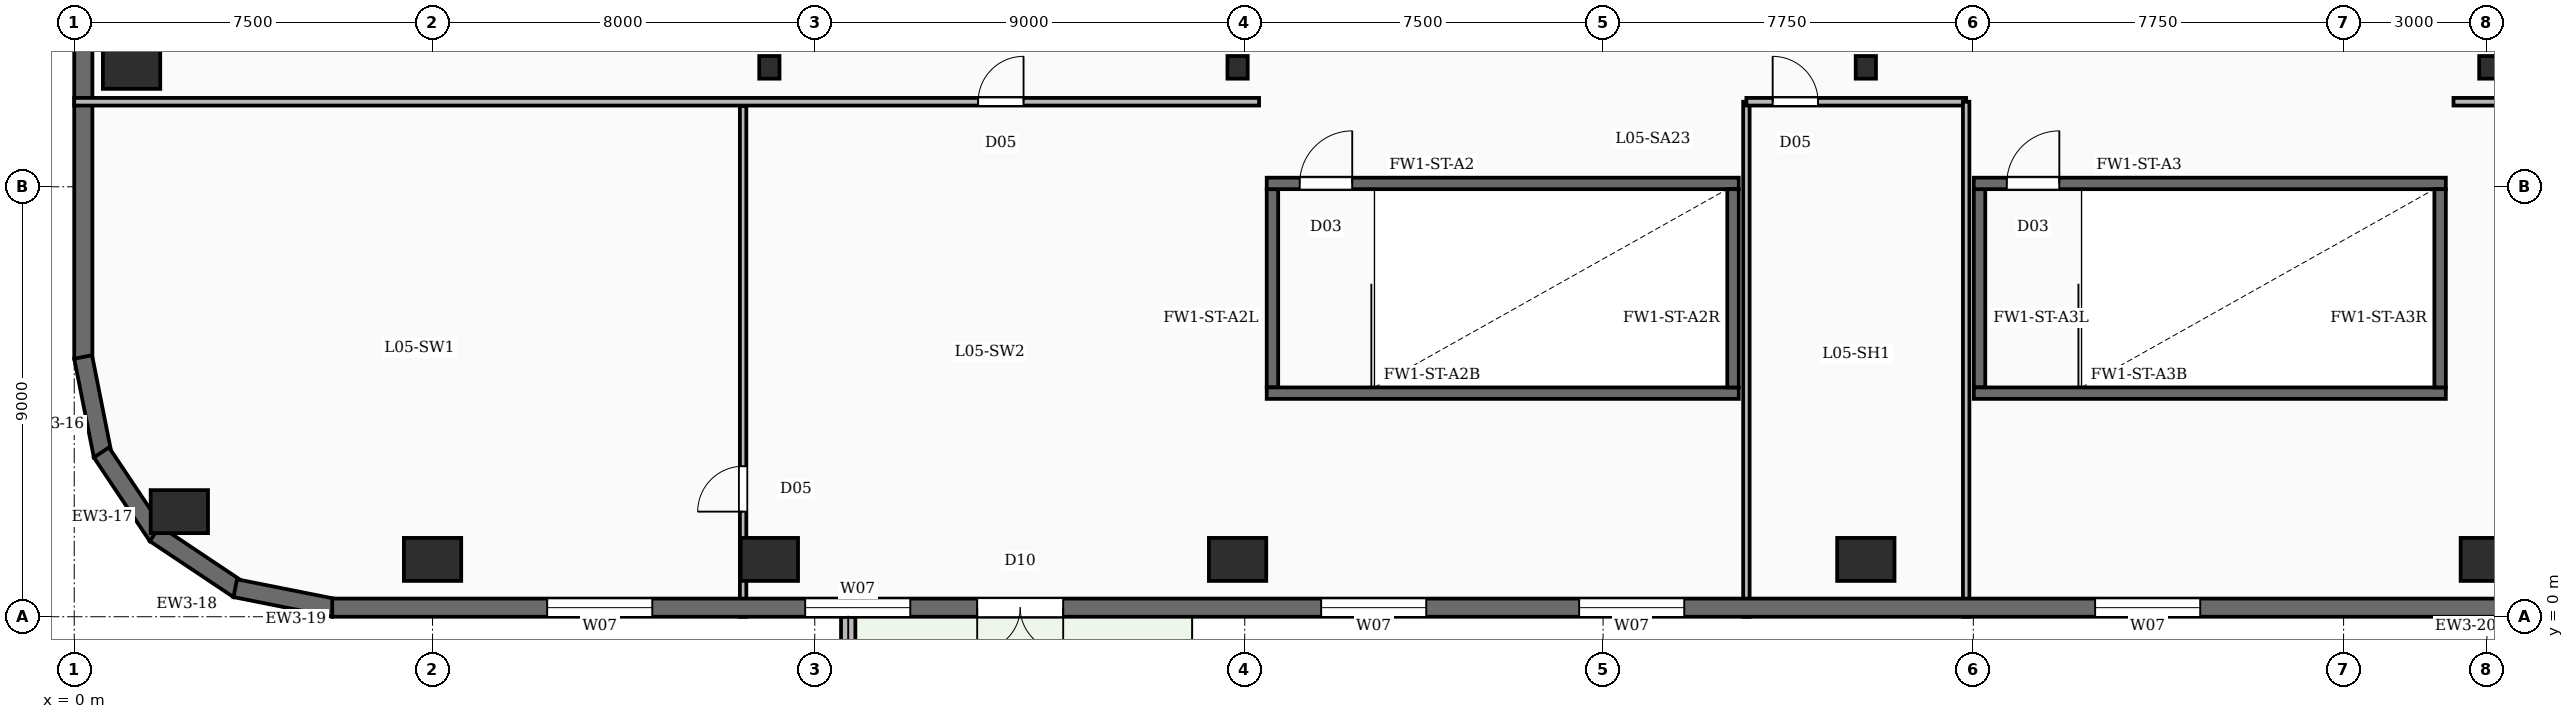
"""IFC4 building model, lengths in metres.
Left out: names, types, materials, properties, quantities, classifications, styles, units other than length and angle.
Written with IfcOpenShell. Run it as: python <this file> out.ifc"""

import sys

from ifc_helpers import new_model, si_unit, direction, frame, frame_2d, origin, origin_2d, place, context, subcontext, project, spatial, rectangle, i_section, extrude, element, fill, save


model = new_model("IFC4")
c1 = context("Model", 3, precision=1e-05, world=origin(), true_north=direction((0.0, 1.0)))
c2 = subcontext(c1, "Body", "Model", "MODEL_VIEW")
j1 = project(units=[si_unit("LENGTHUNIT", "METRE"), si_unit("PLANEANGLEUNIT", "RADIAN")], contexts=[c1])
p1 = place(None, origin())
s1 = spatial("IfcSite", under=j1, at=p1, CompositionType="ELEMENT")
p2 = place(p1, origin())
s2 = spatial("IfcBuilding", under=s1, at=p2, CompositionType="ELEMENT")
p3 = place(p2, frame((0.0, 0.0, 28.0)))
s3 = spatial("IfcBuildingStorey", under=s2, at=p3, CompositionType="ELEMENT", Elevation=28.0)
for number, where, z_axis, x_axis in (
    (1, (2.2, 2.2, -0.35), (0.0, 0.0, 1.0), (1.0, 0.0, 0.0)),
    (2, (7.5, 1.2, -0.35), (0.0, 0.0, 1.0), (1.0, 0.0, 0.0)),
    (3, (14.55, 1.2, -0.35), (0.0, 0.0, 1.0), (1.0, 0.0, 0.0)),
    (4, (24.35, 1.2, -0.35), (0.0, 0.0, 1.0), (1.0, 0.0, 0.0)),
    (5, (37.5, 1.2, -0.35), (0.0, 0.0, 1.0), (1.0, 0.0, 0.0)),
    (6, (50.55, 1.2, -0.35), (0.0, 0.0, 1.0), (1.0, 0.0, 0.0)),
    (7, (1.2, 11.5, -0.35), (0.0, 0.0, 1.0), (1.0, 0.0, 0.0)),
):
    element("IfcColumn", number, at=place(p3, frame(where, z_axis=z_axis, x_axis=x_axis)), inside=s3, PredefinedType="COLUMN", context=c2, shape_type="SweptSolid", body=[
        extrude(rectangle(XDim=1.2, YDim=0.9, at=origin_2d()), origin(), (0.0, 0.0, 1.0), 5.9),
    ])
for number, where, z_axis, x_axis in (
    (8, (14.55, 11.5, -0.35), (0.0, 0.0, 1.0), (1.0, 0.0, 0.0)),
    (9, (24.35, 11.5, -0.35), (0.0, 0.0, 1.0), (1.0, 0.0, 0.0)),
    (10, (37.5, 11.5, -0.35), (0.0, 0.0, 1.0), (1.0, 0.0, 0.0)),
    (11, (50.55, 11.5, -0.35), (0.0, 0.0, 1.0), (1.0, 0.0, 0.0)),
):
    element("IfcColumn", number, at=place(p3, frame(where, z_axis=z_axis, x_axis=x_axis)), inside=s3, PredefinedType="COLUMN", context=c2, shape_type="SweptSolid", body=[
        extrude(i_section(OverallWidth=0.424, OverallDepth=0.474, WebThickness=0.048, FlangeThickness=0.077, FilletRadius=0.02, at=origin_2d()), origin(), (0.0, 0.0, 1.0), 5.9),
    ])
p4 = place(p3, frame((0.19, 5.4, 0.0), z_axis=(0.0, 0.0, 1.0), x_axis=(0.0, 1.0, 0.0)))
e12 = element("IfcWall", 12, at=p4, inside=s3, PredefinedType="SOLIDWALL", context=c2, shape_type="SweptSolid", body=[
    extrude(rectangle(XDim=43.7, YDim=0.38, at=frame_2d((21.85, 0.0))), origin(), (0.0, 0.0, 1.0), 5.55),
])
p5 = place(p4, frame((8.0, 0.0, 0.95)))
e13 = element("IfcOpeningElement", 13, at=p5, cuts=e12, PredefinedType="OPENING", context=c2, shape_type="SweptSolid", body=[
    extrude(rectangle(XDim=2.2, YDim=2.5, at=frame_2d((1.1, 1.25))), frame((0.0, 0.2, 0.0), z_axis=(0.0, -1.0, 0.0), x_axis=(1.0, 0.0, 0.0)), (0.0, 0.0, 1.0), 0.4),
])
p6 = place(p4, frame((18.8, 0.0, 0.95)))
e14 = element("IfcOpeningElement", 14, at=p6, cuts=e12, PredefinedType="OPENING", context=c2, shape_type="SweptSolid", body=[
    extrude(rectangle(XDim=2.2, YDim=2.5, at=frame_2d((1.1, 1.25))), frame((0.0, 0.2, 0.0), z_axis=(0.0, -1.0, 0.0), x_axis=(1.0, 0.0, 0.0)), (0.0, 0.0, 1.0), 0.4),
])
p7 = place(p4, frame((29.6, 0.0, 0.95)))
e15 = element("IfcOpeningElement", 15, at=p7, cuts=e12, PredefinedType="OPENING", context=c2, shape_type="SweptSolid", body=[
    extrude(rectangle(XDim=2.2, YDim=2.5, at=frame_2d((1.1, 1.25))), frame((0.0, 0.2, 0.0), z_axis=(0.0, -1.0, 0.0), x_axis=(1.0, 0.0, 0.0)), (0.0, 0.0, 1.0), 0.4),
])
for number, where, z_axis, x_axis in (
    (16, (0.597, 3.371, 0.0), (0.0, 0.0, 1.0), (-0.195, 0.981, 0.0)),
    (17, (1.74, 1.687, 0.0), (0.0, 0.0, 1.0), (-0.556, 0.832, 0.0)),
    (18, (3.439, 0.569, 0.0), (0.0, 0.0, 1.0), (-0.832, 0.556, 0.0)),
    (19, (5.437, 0.186, 0.0), (0.0, 0.0, 1.0), (-0.981, 0.195, 0.0)),
):
    element("IfcWall", number, at=place(p3, frame(where, z_axis=z_axis, x_axis=x_axis)), inside=s3, PredefinedType="SOLIDWALL", context=c2, shape_type="SweptSolid", body=[
        extrude(rectangle(XDim=2.107, YDim=0.38, at=frame_2d((1.053, 0.0))), origin(), (0.0, 0.0, 1.0), 5.55),
    ])
p8 = place(p3, frame((74.1, 0.19, 0.0), z_axis=(0.0, 0.0, 1.0), x_axis=(-1.0, 0.0, 0.0)))
e20 = element("IfcWall", 20, at=p8, inside=s3, PredefinedType="SOLIDWALL", context=c2, shape_type="SweptSolid", body=[
    extrude(rectangle(XDim=68.7, YDim=0.38, at=frame_2d((34.35, 0.0))), origin(), (0.0, 0.0, 1.0), 5.55),
])
p9 = place(p8, frame((53.4, 0.0, 0.0)))
e21 = element("IfcOpeningElement", 21, at=p9, cuts=e20, PredefinedType="OPENING", context=c2, shape_type="SweptSolid", body=[
    extrude(rectangle(XDim=1.8, YDim=2.25, at=frame_2d((0.9, 1.125))), frame((0.0, 0.2, 0.0), z_axis=(0.0, -1.0, 0.0), x_axis=(1.0, 0.0, 0.0)), (0.0, 0.0, 1.0), 0.4),
])
p10 = place(p8, frame((18.8, 0.0, 0.95)))
e22 = element("IfcOpeningElement", 22, at=p10, cuts=e20, PredefinedType="OPENING", context=c2, shape_type="SweptSolid", body=[
    extrude(rectangle(XDim=2.2, YDim=2.5, at=frame_2d((1.1, 1.25))), frame((0.0, 0.2, 0.0), z_axis=(0.0, -1.0, 0.0), x_axis=(1.0, 0.0, 0.0)), (0.0, 0.0, 1.0), 0.4),
])
p11 = place(p8, frame((29.6, 0.0, 0.95)))
e23 = element("IfcOpeningElement", 23, at=p11, cuts=e20, PredefinedType="OPENING", context=c2, shape_type="SweptSolid", body=[
    extrude(rectangle(XDim=2.2, YDim=2.5, at=frame_2d((1.1, 1.25))), frame((0.0, 0.2, 0.0), z_axis=(0.0, -1.0, 0.0), x_axis=(1.0, 0.0, 0.0)), (0.0, 0.0, 1.0), 0.4),
])
p12 = place(p8, frame((40.4, 0.0, 0.95)))
e24 = element("IfcOpeningElement", 24, at=p12, cuts=e20, PredefinedType="OPENING", context=c2, shape_type="SweptSolid", body=[
    extrude(rectangle(XDim=2.2, YDim=2.5, at=frame_2d((1.1, 1.25))), frame((0.0, 0.2, 0.0), z_axis=(0.0, -1.0, 0.0), x_axis=(1.0, 0.0, 0.0)), (0.0, 0.0, 1.0), 0.4),
])
p13 = place(p8, frame((45.8, 0.0, 0.95)))
e25 = element("IfcOpeningElement", 25, at=p13, cuts=e20, PredefinedType="OPENING", context=c2, shape_type="SweptSolid", body=[
    extrude(rectangle(XDim=2.2, YDim=2.5, at=frame_2d((1.1, 1.25))), frame((0.0, 0.2, 0.0), z_axis=(0.0, -1.0, 0.0), x_axis=(1.0, 0.0, 0.0)), (0.0, 0.0, 1.0), 0.4),
])
p14 = place(p8, frame((56.6, 0.0, 0.95)))
e26 = element("IfcOpeningElement", 26, at=p14, cuts=e20, PredefinedType="OPENING", context=c2, shape_type="SweptSolid", body=[
    extrude(rectangle(XDim=2.2, YDim=2.5, at=frame_2d((1.1, 1.25))), frame((0.0, 0.2, 0.0), z_axis=(0.0, -1.0, 0.0), x_axis=(1.0, 0.0, 0.0)), (0.0, 0.0, 1.0), 0.4),
])
p15 = place(p8, frame((62.0, 0.0, 0.95)))
e27 = element("IfcOpeningElement", 27, at=p15, cuts=e20, PredefinedType="OPENING", context=c2, shape_type="SweptSolid", body=[
    extrude(rectangle(XDim=2.2, YDim=2.5, at=frame_2d((1.1, 1.25))), frame((0.0, 0.2, 0.0), z_axis=(0.0, -1.0, 0.0), x_axis=(1.0, 0.0, 0.0)), (0.0, 0.0, 1.0), 0.4),
])
p16 = place(p3, frame((16.2, 0.0, 0.0), z_axis=(0.0, 0.0, 1.0), x_axis=(0.0, -1.0, 0.0)))
e28 = element("IfcWall", 28, at=p16, inside=s3, PredefinedType="PARAPET", context=c2, shape_type="SweptSolid", body=[
    extrude(rectangle(XDim=2.4, YDim=0.3, at=frame_2d((1.2, 0.0))), origin(), (0.0, 0.0, 1.0), 1.12),
])
p17 = place(p3, frame((24.96, 9.07, 0.0), z_axis=(0.0, 0.0, 1.0), x_axis=(1.0, 0.0, 0.0)))
e29 = element("IfcWall", 29, at=p17, inside=s3, PredefinedType="SOLIDWALL", context=c2, shape_type="SweptSolid", body=[
    extrude(rectangle(XDim=9.88, YDim=0.24, at=frame_2d((4.94, 0.0))), origin(), (0.0, 0.0, 1.0), 5.55),
])
p18 = place(p17, frame((0.69, 0.0, 0.0)))
e30 = element("IfcOpeningElement", 30, at=p18, cuts=e29, PredefinedType="OPENING", context=c2, shape_type="SweptSolid", body=[
    extrude(rectangle(XDim=1.1, YDim=2.15, at=frame_2d((0.55, 1.075))), frame((0.0, 0.13, 0.0), z_axis=(0.0, -1.0, 0.0), x_axis=(1.0, 0.0, 0.0)), (0.0, 0.0, 1.0), 0.26),
])
p19 = place(p3, frame((24.96, 4.68, 0.0), z_axis=(0.0, 0.0, 1.0), x_axis=(1.0, 0.0, 0.0)))
e31 = element("IfcWall", 31, at=p19, inside=s3, PredefinedType="SOLIDWALL", context=c2, shape_type="SweptSolid", body=[
    extrude(rectangle(XDim=9.88, YDim=0.24, at=frame_2d((4.94, 0.0))), origin(), (0.0, 0.0, 1.0), 5.55),
])
for number, where, z_axis, x_axis in (
    (32, (25.08, 4.8, 0.0), (0.0, 0.0, 1.0), (0.0, 1.0, 0.0)),
    (33, (34.72, 4.8, 0.0), (0.0, 0.0, 1.0), (0.0, 1.0, 0.0)),
):
    element("IfcWall", number, at=place(p3, frame(where, z_axis=z_axis, x_axis=x_axis)), inside=s3, PredefinedType="SOLIDWALL", context=c2, shape_type="SweptSolid", body=[
        extrude(rectangle(XDim=4.15, YDim=0.24, at=frame_2d((2.075, 0.0))), origin(), (0.0, 0.0, 1.0), 5.55),
    ])
p20 = place(p3, frame((39.76, 9.07, 0.0), z_axis=(0.0, 0.0, 1.0), x_axis=(1.0, 0.0, 0.0)))
e34 = element("IfcWall", 34, at=p20, inside=s3, PredefinedType="SOLIDWALL", context=c2, shape_type="SweptSolid", body=[
    extrude(rectangle(XDim=9.88, YDim=0.24, at=frame_2d((4.94, 0.0))), origin(), (0.0, 0.0, 1.0), 5.55),
])
p21 = place(p20, frame((0.69, 0.0, 0.0)))
e35 = element("IfcOpeningElement", 35, at=p21, cuts=e34, PredefinedType="OPENING", context=c2, shape_type="SweptSolid", body=[
    extrude(rectangle(XDim=1.1, YDim=2.15, at=frame_2d((0.55, 1.075))), frame((0.0, 0.13, 0.0), z_axis=(0.0, -1.0, 0.0), x_axis=(1.0, 0.0, 0.0)), (0.0, 0.0, 1.0), 0.26),
])
p22 = place(p3, frame((39.76, 4.68, 0.0), z_axis=(0.0, 0.0, 1.0), x_axis=(1.0, 0.0, 0.0)))
e36 = element("IfcWall", 36, at=p22, inside=s3, PredefinedType="SOLIDWALL", context=c2, shape_type="SweptSolid", body=[
    extrude(rectangle(XDim=9.88, YDim=0.24, at=frame_2d((4.94, 0.0))), origin(), (0.0, 0.0, 1.0), 5.55),
])
for number, where, z_axis, x_axis in (
    (37, (39.88, 4.8, 0.0), (0.0, 0.0, 1.0), (0.0, 1.0, 0.0)),
    (38, (49.52, 4.8, 0.0), (0.0, 0.0, 1.0), (0.0, 1.0, 0.0)),
):
    element("IfcWall", number, at=place(p3, frame(where, z_axis=z_axis, x_axis=x_axis)), inside=s3, PredefinedType="SOLIDWALL", context=c2, shape_type="SweptSolid", body=[
        extrude(rectangle(XDim=4.15, YDim=0.24, at=frame_2d((2.075, 0.0))), origin(), (0.0, 0.0, 1.0), 5.55),
    ])
p23 = place(p3, frame((14.0, 0.0, 0.0), z_axis=(0.0, 0.0, 1.0), x_axis=(0.0, 1.0, 0.0)))
e39 = element("IfcWall", 39, at=p23, inside=s3, PredefinedType="PARTITIONING", context=c2, shape_type="SweptSolid", body=[
    extrude(rectangle(XDim=10.69, YDim=0.135, at=frame_2d((5.345, 0.0))), origin(), (0.0, 0.0, 1.0), 4.61),
])
p24 = place(p23, frame((2.2, 0.0, 0.0)))
e40 = element("IfcOpeningElement", 40, at=p24, cuts=e39, PredefinedType="OPENING", context=c2, shape_type="SweptSolid", body=[
    extrude(rectangle(XDim=0.95, YDim=2.15, at=frame_2d((0.475, 1.075))), frame((0.0, 0.077, 0.0), z_axis=(0.0, -1.0, 0.0), x_axis=(1.0, 0.0, 0.0)), (0.0, 0.0, 1.0), 0.155),
])
p25 = place(p3, frame((0.0, 10.78, 0.0), z_axis=(0.0, 0.0, 1.0), x_axis=(1.0, 0.0, 0.0)))
e41 = element("IfcWall", 41, at=p25, inside=s3, PredefinedType="PARTITIONING", context=c2, shape_type="SweptSolid", body=[
    extrude(rectangle(XDim=24.8, YDim=0.16, at=frame_2d((12.4, 0.0))), origin(), (0.0, 0.0, 1.0), 4.61),
])
p26 = place(p25, frame((18.92, 0.0, 0.0)))
e42 = element("IfcOpeningElement", 42, at=p26, cuts=e41, PredefinedType="OPENING", context=c2, shape_type="SweptSolid", body=[
    extrude(rectangle(XDim=0.95, YDim=2.15, at=frame_2d((0.475, 1.075))), frame((0.0, 0.09, 0.0), z_axis=(0.0, -1.0, 0.0), x_axis=(1.0, 0.0, 0.0)), (0.0, 0.0, 1.0), 0.18),
])
p27 = place(p3, frame((49.8, 10.78, 0.0), z_axis=(0.0, 0.0, 1.0), x_axis=(1.0, 0.0, 0.0)))
e43 = element("IfcWall", 43, at=p27, inside=s3, PredefinedType="PARTITIONING", context=c2, shape_type="SweptSolid", body=[
    extrude(rectangle(XDim=29.7, YDim=0.16, at=frame_2d((14.85, 0.0))), origin(), (0.0, 0.0, 1.0), 4.61),
])
p28 = place(p27, frame((2.62, 0.0, 0.0)))
e44 = element("IfcOpeningElement", 44, at=p28, cuts=e43, PredefinedType="OPENING", context=c2, shape_type="SweptSolid", body=[
    extrude(rectangle(XDim=0.95, YDim=2.15, at=frame_2d((0.475, 1.075))), frame((0.0, 0.09, 0.0), z_axis=(0.0, -1.0, 0.0), x_axis=(1.0, 0.0, 0.0)), (0.0, 0.0, 1.0), 0.18),
])
p29 = place(p27, frame((7.85, 0.0, 0.0)))
e45 = element("IfcOpeningElement", 45, at=p29, cuts=e43, PredefinedType="OPENING", context=c2, shape_type="SweptSolid", body=[
    extrude(rectangle(XDim=0.95, YDim=2.15, at=frame_2d((0.475, 1.075))), frame((0.0, 0.09, 0.0), z_axis=(0.0, -1.0, 0.0), x_axis=(1.0, 0.0, 0.0)), (0.0, 0.0, 1.0), 0.18),
])
p30 = place(p27, frame((16.718, 0.0, 0.0)))
e46 = element("IfcOpeningElement", 46, at=p30, cuts=e43, PredefinedType="OPENING", context=c2, shape_type="SweptSolid", body=[
    extrude(rectangle(XDim=0.95, YDim=2.15, at=frame_2d((0.475, 1.075))), frame((0.0, 0.09, 0.0), z_axis=(0.0, -1.0, 0.0), x_axis=(1.0, 0.0, 0.0)), (0.0, 0.0, 1.0), 0.18),
])
p31 = place(p27, frame((21.02, 0.0, 0.0)))
e47 = element("IfcOpeningElement", 47, at=p31, cuts=e43, PredefinedType="OPENING", context=c2, shape_type="SweptSolid", body=[
    extrude(rectangle(XDim=0.95, YDim=2.15, at=frame_2d((0.475, 1.075))), frame((0.0, 0.09, 0.0), z_axis=(0.0, -1.0, 0.0), x_axis=(1.0, 0.0, 0.0)), (0.0, 0.0, 1.0), 0.18),
])
p32 = place(p3, frame((35.0, 10.78, 0.0), z_axis=(0.0, 0.0, 1.0), x_axis=(1.0, 0.0, 0.0)))
e48 = element("IfcWall", 48, at=p32, inside=s3, PredefinedType="PARTITIONING", context=c2, shape_type="SweptSolid", body=[
    extrude(rectangle(XDim=4.6, YDim=0.16, at=frame_2d((2.3, 0.0))), origin(), (0.0, 0.0, 1.0), 4.61),
])
p33 = place(p32, frame((0.55, 0.0, 0.0)))
e49 = element("IfcOpeningElement", 49, at=p33, cuts=e48, PredefinedType="OPENING", context=c2, shape_type="SweptSolid", body=[
    extrude(rectangle(XDim=0.95, YDim=2.15, at=frame_2d((0.475, 1.075))), frame((0.0, 0.09, 0.0), z_axis=(0.0, -1.0, 0.0), x_axis=(1.0, 0.0, 0.0)), (0.0, 0.0, 1.0), 0.18),
])
for number, where, z_axis, x_axis in (
    (50, (35.0, 0.0, 0.0), (0.0, 0.0, 1.0), (0.0, 1.0, 0.0)),
    (51, (39.6, 0.0, 0.0), (0.0, 0.0, 1.0), (0.0, 1.0, 0.0)),
):
    element("IfcWall", number, at=place(p3, frame(where, z_axis=z_axis, x_axis=x_axis)), inside=s3, PredefinedType="PARTITIONING", context=c2, shape_type="SweptSolid", body=[
        extrude(rectangle(XDim=10.78, YDim=0.135, at=frame_2d((5.39, 0.0))), origin(), (0.0, 0.0, 1.0), 4.61),
    ])
p34 = place(p9, origin())
e52 = element("IfcDoor", 52, at=p34, inside=s3, OperationType="DOUBLE_DOOR_SINGLE_SWING", PredefinedType="DOOR", context=c2, shape_type="SweptSolid", body=[
    extrude(rectangle(XDim=1.8, YDim=2.25, at=frame_2d((0.9, 1.125))), frame((0.0, 0.025, 0.0), z_axis=(0.0, -1.0, 0.0), x_axis=(1.0, 0.0, 0.0)), (0.0, 0.0, 1.0), 0.05),
])
fill(e21, e52)
p35 = place(p11, origin())
e53 = element("IfcWindow", 53, at=p35, inside=s3, PartitioningType="DOUBLE_PANEL_VERTICAL", PredefinedType="WINDOW", context=c2, shape_type="SweptSolid", body=[
    extrude(rectangle(XDim=2.2, YDim=2.5, at=frame_2d((1.1, 1.25))), frame((0.0, 0.03, 0.0), z_axis=(0.0, -1.0, 0.0), x_axis=(1.0, 0.0, 0.0)), (0.0, 0.0, 1.0), 0.06),
])
fill(e23, e53)
p36 = place(p12, origin())
e54 = element("IfcWindow", 54, at=p36, inside=s3, PartitioningType="DOUBLE_PANEL_VERTICAL", PredefinedType="WINDOW", context=c2, shape_type="SweptSolid", body=[
    extrude(rectangle(XDim=2.2, YDim=2.5, at=frame_2d((1.1, 1.25))), frame((0.0, 0.03, 0.0), z_axis=(0.0, -1.0, 0.0), x_axis=(1.0, 0.0, 0.0)), (0.0, 0.0, 1.0), 0.06),
])
fill(e24, e54)
p37 = place(p13, origin())
e55 = element("IfcWindow", 55, at=p37, inside=s3, PartitioningType="DOUBLE_PANEL_VERTICAL", PredefinedType="WINDOW", context=c2, shape_type="SweptSolid", body=[
    extrude(rectangle(XDim=2.2, YDim=2.5, at=frame_2d((1.1, 1.25))), frame((0.0, 0.03, 0.0), z_axis=(0.0, -1.0, 0.0), x_axis=(1.0, 0.0, 0.0)), (0.0, 0.0, 1.0), 0.06),
])
fill(e25, e55)
p38 = place(p14, origin())
e56 = element("IfcWindow", 56, at=p38, inside=s3, PartitioningType="DOUBLE_PANEL_VERTICAL", PredefinedType="WINDOW", context=c2, shape_type="SweptSolid", body=[
    extrude(rectangle(XDim=2.2, YDim=2.5, at=frame_2d((1.1, 1.25))), frame((0.0, 0.03, 0.0), z_axis=(0.0, -1.0, 0.0), x_axis=(1.0, 0.0, 0.0)), (0.0, 0.0, 1.0), 0.06),
])
fill(e26, e56)
p39 = place(p15, origin())
e57 = element("IfcWindow", 57, at=p39, inside=s3, PartitioningType="DOUBLE_PANEL_VERTICAL", PredefinedType="WINDOW", context=c2, shape_type="SweptSolid", body=[
    extrude(rectangle(XDim=2.2, YDim=2.5, at=frame_2d((1.1, 1.25))), frame((0.0, 0.03, 0.0), z_axis=(0.0, -1.0, 0.0), x_axis=(1.0, 0.0, 0.0)), (0.0, 0.0, 1.0), 0.06),
])
fill(e27, e57)
p40 = place(p18, origin())
e58 = element("IfcDoor", 58, at=p40, inside=s3, OperationType="SINGLE_SWING_RIGHT", PredefinedType="DOOR", context=c2, shape_type="SweptSolid", body=[
    extrude(rectangle(XDim=1.1, YDim=2.15, at=frame_2d((0.55, 1.075))), frame((0.0, 0.025, 0.0), z_axis=(0.0, -1.0, 0.0), x_axis=(1.0, 0.0, 0.0)), (0.0, 0.0, 1.0), 0.05),
])
fill(e30, e58)
p41 = place(p21, origin())
e59 = element("IfcDoor", 59, at=p41, inside=s3, OperationType="SINGLE_SWING_RIGHT", PredefinedType="DOOR", context=c2, shape_type="SweptSolid", body=[
    extrude(rectangle(XDim=1.1, YDim=2.15, at=frame_2d((0.55, 1.075))), frame((0.0, 0.025, 0.0), z_axis=(0.0, -1.0, 0.0), x_axis=(1.0, 0.0, 0.0)), (0.0, 0.0, 1.0), 0.05),
])
fill(e35, e59)
p42 = place(p24, origin())
e60 = element("IfcDoor", 60, at=p42, inside=s3, OperationType="SINGLE_SWING_LEFT", PredefinedType="DOOR", context=c2, shape_type="SweptSolid", body=[
    extrude(rectangle(XDim=0.95, YDim=2.15, at=frame_2d((0.475, 1.075))), frame((0.0, 0.025, 0.0), z_axis=(0.0, -1.0, 0.0), x_axis=(1.0, 0.0, 0.0)), (0.0, 0.0, 1.0), 0.05),
])
fill(e40, e60)
p43 = place(p26, origin())
e61 = element("IfcDoor", 61, at=p43, inside=s3, OperationType="SINGLE_SWING_RIGHT", PredefinedType="DOOR", context=c2, shape_type="SweptSolid", body=[
    extrude(rectangle(XDim=0.95, YDim=2.15, at=frame_2d((0.475, 1.075))), frame((0.0, 0.025, 0.0), z_axis=(0.0, -1.0, 0.0), x_axis=(1.0, 0.0, 0.0)), (0.0, 0.0, 1.0), 0.05),
])
fill(e42, e61)
p44 = place(p33, origin())
e62 = element("IfcDoor", 62, at=p44, inside=s3, OperationType="SINGLE_SWING_LEFT", PredefinedType="DOOR", context=c2, shape_type="SweptSolid", body=[
    extrude(rectangle(XDim=0.95, YDim=2.15, at=frame_2d((0.475, 1.075))), frame((0.0, 0.025, 0.0), z_axis=(0.0, -1.0, 0.0), x_axis=(1.0, 0.0, 0.0)), (0.0, 0.0, 1.0), 0.05),
])
fill(e49, e62)
save(model, sys.argv[1])
